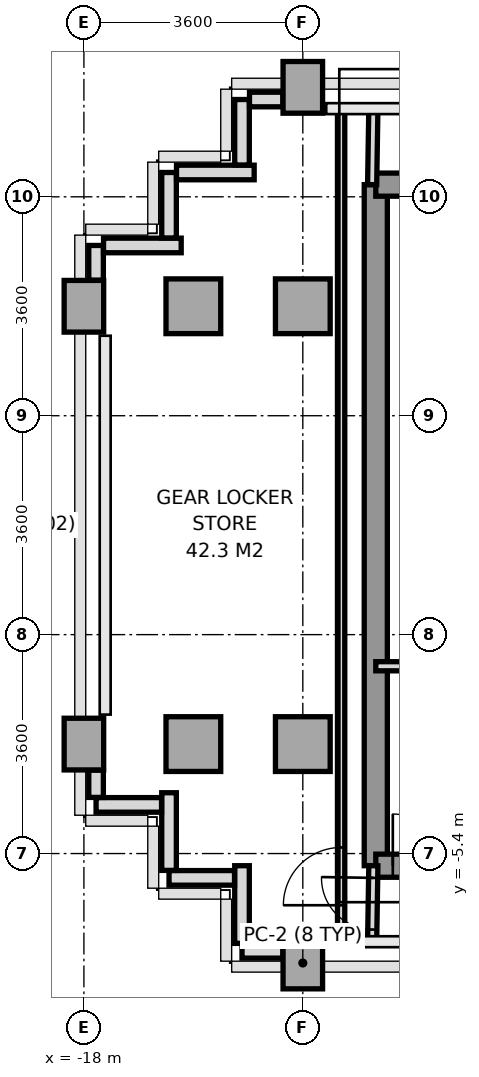
"""IFC4 building model, lengths in metres.
Left out: names, types, materials, properties, quantities, classifications, styles, units other than length and angle.
Written with IfcOpenShell. Run it as: python <this file> out.ifc"""

import sys

from ifc_helpers import new_model, si_unit, direction, frame, frame_2d, origin, origin_2d, place, context, subcontext, project, spatial, rectangle, extrude, source, transform, mapped, element, fill, save


model = new_model("IFC4")
c1 = context("Model", 3, precision=1e-05, world=origin(), true_north=direction((0.0, 1.0)))
c2 = subcontext(c1, "Body", "Model", "MODEL_VIEW")
j1 = project(units=[si_unit("LENGTHUNIT", "METRE"), si_unit("PLANEANGLEUNIT", "RADIAN")], contexts=[c1])
p1 = place(None, origin())
s1 = spatial("IfcSite", under=j1, at=p1, CompositionType="ELEMENT")
p2 = place(p1, origin())
s2 = spatial("IfcBuilding", under=s1, at=p2, CompositionType="ELEMENT")
p3 = place(p2, frame((0.0, 0.0, 167.2)))
s3 = spatial("IfcBuildingStorey", under=s2, at=p3, CompositionType="ELEMENT", Elevation=167.2)
m1 = source(origin(), c2, "Body", "SweptSolid", [
    extrude(rectangle(XDim=0.65, YDim=0.85, at=origin_2d()), origin(), (0.0, 0.0, 1.0), 3.2),
])
for number, where, z_axis, x_axis in (
    (1, (-18.0, -3.6, 0.0), (0.0, 0.0, 1.0), (1.0, 0.0, 0.0)),
    (2, (-18.0, 3.6, 0.0), (0.0, 0.0, 1.0), (1.0, 0.0, 0.0)),
):
    element("IfcColumn", number, at=place(p3, frame(where, z_axis=z_axis, x_axis=x_axis)), inside=s3, PredefinedType="COLUMN", context=c2, shape_type="MappedRepresentation", body=[
        mapped(m1, transform((0.0, 0.0, 0.0), x_axis=(1.0, 0.0, 0.0), y_axis=(0.0, 1.0, 0.0), z_axis=(0.0, 0.0, 1.0), scale=1.0)),
    ])
m2 = source(origin(), c2, "Body", "SweptSolid", [
    extrude(rectangle(XDim=0.9, YDim=0.9, at=origin_2d()), origin(), (0.0, 0.0, 1.0), 3.2),
])
for number, where, z_axis, x_axis in (
    (3, (-16.2, -3.6, 0.0), (0.0, 0.0, 1.0), (1.0, 0.0, 0.0)),
    (4, (-16.2, 3.6, 0.0), (0.0, 0.0, 1.0), (1.0, 0.0, 0.0)),
):
    element("IfcColumn", number, at=place(p3, frame(where, z_axis=z_axis, x_axis=x_axis)), inside=s3, PredefinedType="COLUMN", context=c2, shape_type="MappedRepresentation", body=[
        mapped(m2, transform((0.0, 0.0, 0.0), x_axis=(1.0, 0.0, 0.0), y_axis=(0.0, 1.0, 0.0), z_axis=(0.0, 0.0, 1.0), scale=1.0)),
    ])
p4 = place(p3, frame((-14.4, -7.2, 0.0), z_axis=(0.0, 0.0, 1.0), x_axis=(1.0, 0.0, 0.0)))
e5 = element("IfcColumn", 5, at=p4, inside=s3, PredefinedType="COLUMN", context=c2, shape_type="MappedRepresentation", body=[
    mapped(m1, transform((0.0, 0.0, 0.0), x_axis=(1.0, 0.0, 0.0), y_axis=(0.0, 1.0, 0.0), z_axis=(0.0, 0.0, 1.0), scale=1.0)),
])
for number, where, z_axis, x_axis in (
    (6, (-14.4, -3.6, 0.0), (0.0, 0.0, 1.0), (1.0, 0.0, 0.0)),
    (7, (-14.4, 3.6, 0.0), (0.0, 0.0, 1.0), (1.0, 0.0, 0.0)),
):
    element("IfcColumn", number, at=place(p3, frame(where, z_axis=z_axis, x_axis=x_axis)), inside=s3, PredefinedType="COLUMN", context=c2, shape_type="MappedRepresentation", body=[
        mapped(m2, transform((0.0, 0.0, 0.0), x_axis=(1.0, 0.0, 0.0), y_axis=(0.0, 1.0, 0.0), z_axis=(0.0, 0.0, 1.0), scale=1.0)),
    ])
p5 = place(p3, frame((-14.4, 7.2, 0.0), z_axis=(0.0, 0.0, 1.0), x_axis=(1.0, 0.0, 0.0)))
e8 = element("IfcColumn", 8, at=p5, inside=s3, PredefinedType="COLUMN", context=c2, shape_type="MappedRepresentation", body=[
    mapped(m1, transform((0.0, 0.0, 0.0), x_axis=(1.0, 0.0, 0.0), y_axis=(0.0, 1.0, 0.0), z_axis=(0.0, 0.0, 1.0), scale=1.0)),
])
p6 = place(p3, frame((-14.728, -7.0, 0.0), z_axis=(0.0, 0.0, 1.0), x_axis=(-1.0, 0.0, 0.0)))
e9 = element("IfcWall", 9, at=p6, inside=s3, PredefinedType="PARAPET", context=c2, shape_type="SweptSolid", body=[
    extrude(rectangle(XDim=0.672, YDim=0.24, at=frame_2d((0.336, 0.0))), origin(), (0.0, 0.0, 1.0), 1.15),
])
p7 = place(p3, frame((-15.4, -6.877, 0.0), z_axis=(0.0, 0.0, 1.0), x_axis=(0.0, 1.0, 0.0)))
e10 = element("IfcWall", 10, at=p7, inside=s3, PredefinedType="PARAPET", context=c2, shape_type="SweptSolid", body=[
    extrude(rectangle(XDim=1.277, YDim=0.24, at=frame_2d((0.638, 0.0))), origin(), (0.0, 0.0, 1.0), 1.15),
])
p8 = place(p3, frame((-15.523, -5.8, 0.0), z_axis=(0.0, 0.0, 1.0), x_axis=(-1.0, 0.0, 0.0)))
e11 = element("IfcWall", 11, at=p8, inside=s3, PredefinedType="PARAPET", context=c2, shape_type="SweptSolid", body=[
    extrude(rectangle(XDim=1.077, YDim=0.24, at=frame_2d((0.539, 0.0))), origin(), (0.0, 0.0, 1.0), 1.15),
])
p9 = place(p3, frame((-16.6, -5.677, 0.0), z_axis=(0.0, 0.0, 1.0), x_axis=(0.0, 1.0, 0.0)))
e12 = element("IfcWall", 12, at=p9, inside=s3, PredefinedType="PARAPET", context=c2, shape_type="SweptSolid", body=[
    extrude(rectangle(XDim=1.277, YDim=0.24, at=frame_2d((0.639, 0.0))), origin(), (0.0, 0.0, 1.0), 1.15),
])
p10 = place(p3, frame((-16.723, -4.6, 0.0), z_axis=(0.0, 0.0, 1.0), x_axis=(-1.0, 0.0, 0.0)))
e13 = element("IfcWall", 13, at=p10, inside=s3, PredefinedType="PARAPET", context=c2, shape_type="SweptSolid", body=[
    extrude(rectangle(XDim=1.077, YDim=0.24, at=frame_2d((0.539, 0.0))), origin(), (0.0, 0.0, 1.0), 1.15),
])
p11 = place(p3, frame((-17.8, -4.477, 0.0), z_axis=(0.0, 0.0, 1.0), x_axis=(0.0, 1.0, 0.0)))
e14 = element("IfcWall", 14, at=p11, inside=s3, PredefinedType="PARAPET", context=c2, shape_type="SweptSolid", body=[
    extrude(rectangle(XDim=0.449, YDim=0.24, at=frame_2d((0.225, 0.0))), origin(), (0.0, 0.0, 1.0), 1.15),
])
p12 = place(p3, frame((-17.8, 4.028, 0.0), z_axis=(0.0, 0.0, 1.0), x_axis=(0.0, 1.0, 0.0)))
e15 = element("IfcWall", 15, at=p12, inside=s3, PredefinedType="PARAPET", context=c2, shape_type="SweptSolid", body=[
    extrude(rectangle(XDim=0.572, YDim=0.24, at=frame_2d((0.286, 0.0))), origin(), (0.0, 0.0, 1.0), 1.15),
])
p13 = place(p3, frame((-17.677, 4.6, 0.0), z_axis=(0.0, 0.0, 1.0), x_axis=(1.0, 0.0, 0.0)))
e16 = element("IfcWall", 16, at=p13, inside=s3, PredefinedType="PARAPET", context=c2, shape_type="SweptSolid", body=[
    extrude(rectangle(XDim=1.277, YDim=0.24, at=frame_2d((0.639, 0.0))), origin(), (0.0, 0.0, 1.0), 1.15),
])
p14 = place(p3, frame((-16.6, 4.723, 0.0), z_axis=(0.0, 0.0, 1.0), x_axis=(0.0, 1.0, 0.0)))
e17 = element("IfcWall", 17, at=p14, inside=s3, PredefinedType="PARAPET", context=c2, shape_type="SweptSolid", body=[
    extrude(rectangle(XDim=1.077, YDim=0.24, at=frame_2d((0.539, 0.0))), origin(), (0.0, 0.0, 1.0), 1.15),
])
p15 = place(p3, frame((-16.477, 5.8, 0.0), z_axis=(0.0, 0.0, 1.0), x_axis=(1.0, 0.0, 0.0)))
e18 = element("IfcWall", 18, at=p15, inside=s3, PredefinedType="PARAPET", context=c2, shape_type="SweptSolid", body=[
    extrude(rectangle(XDim=1.277, YDim=0.24, at=frame_2d((0.639, 0.0))), origin(), (0.0, 0.0, 1.0), 1.15),
])
p16 = place(p3, frame((-15.4, 5.923, 0.0), z_axis=(0.0, 0.0, 1.0), x_axis=(0.0, 1.0, 0.0)))
e19 = element("IfcWall", 19, at=p16, inside=s3, PredefinedType="PARAPET", context=c2, shape_type="SweptSolid", body=[
    extrude(rectangle(XDim=1.077, YDim=0.24, at=frame_2d((0.539, 0.0))), origin(), (0.0, 0.0, 1.0), 1.15),
])
p17 = place(p3, frame((-15.277, 7.0, 0.0), z_axis=(0.0, 0.0, 1.0), x_axis=(1.0, 0.0, 0.0)))
e20 = element("IfcWall", 20, at=p17, inside=s3, PredefinedType="PARAPET", context=c2, shape_type="SweptSolid", body=[
    extrude(rectangle(XDim=0.549, YDim=0.24, at=frame_2d((0.274, 0.0))), origin(), (0.0, 0.0, 1.0), 1.15),
])
p18 = place(p3, frame((-13.2, -5.6, 0.0), z_axis=(0.0, 0.0, 1.0), x_axis=(0.0, 1.0, 0.0)))
e21 = element("IfcWall", 21, at=p18, inside=s3, PredefinedType="SHEAR", context=c2, shape_type="SweptSolid", body=[
    extrude(rectangle(XDim=11.2, YDim=0.38, at=frame_2d((5.6, 0.0))), origin(), (0.0, 0.0, 1.0), 3.2),
])
p19 = place(p3, frame((-13.2, 5.6, 0.0), z_axis=(0.0, 0.0, 1.0), x_axis=(1.0, 0.0, 0.0)))
e22 = element("IfcWall", 22, at=p19, inside=s3, PredefinedType="SHEAR", context=c2, shape_type="SweptSolid", body=[
    extrude(rectangle(XDim=1.844, YDim=0.38, at=frame_2d((0.922, 0.0))), origin(), (0.0, 0.0, 1.0), 3.2),
])
p20 = place(p3, frame((-13.2, -5.6, 0.0), z_axis=(0.0, 0.0, 1.0), x_axis=(1.0, 0.0, 0.0)))
e23 = element("IfcWall", 23, at=p20, inside=s3, PredefinedType="SHEAR", context=c2, shape_type="SweptSolid", body=[
    extrude(rectangle(XDim=7.8, YDim=0.38, at=frame_2d((3.9, 0.0))), origin(), (0.0, 0.0, 1.0), 3.2),
])
p21 = place(p20, frame((3.6, 0.0, 0.0)))
e24 = element("IfcOpeningElement", 24, at=p21, cuts=e23, PredefinedType="OPENING", context=c2, shape_type="SweptSolid", body=[
    extrude(rectangle(XDim=1.2, YDim=2.2, at=frame_2d((0.6, 1.1))), frame((0.0, 0.2, 0.0), z_axis=(0.0, -1.0, 0.0), x_axis=(1.0, 0.0, 0.0)), (0.0, 0.0, 1.0), 0.4),
])
p22 = place(p20, frame((0.28, 0.0, 0.0)))
e25 = element("IfcOpeningElement", 25, at=p22, cuts=e23, PredefinedType="OPENING", context=c2, shape_type="SweptSolid", body=[
    extrude(rectangle(XDim=0.85, YDim=2.1, at=frame_2d((0.425, 1.05))), frame((0.0, 0.2, 0.0), z_axis=(0.0, -1.0, 0.0), x_axis=(1.0, 0.0, 0.0)), (0.0, 0.0, 1.0), 0.4),
])
p23 = place(p20, frame((1.36, 0.0, 0.0)))
e26 = element("IfcOpeningElement", 26, at=p23, cuts=e23, PredefinedType="OPENING", context=c2, shape_type="SweptSolid", body=[
    extrude(rectangle(XDim=0.85, YDim=2.1, at=frame_2d((0.425, 1.05))), frame((0.0, 0.2, 0.0), z_axis=(0.0, -1.0, 0.0), x_axis=(1.0, 0.0, 0.0)), (0.0, 0.0, 1.0), 0.4),
])
p24 = place(p3, frame((-13.2, -2.32, 0.0), z_axis=(0.0, 0.0, 1.0), x_axis=(1.0, 0.0, 0.0)))
e27 = element("IfcWall", 27, at=p24, inside=s3, PredefinedType="PARTITIONING", context=c2, shape_type="SweptSolid", body=[
    extrude(rectangle(XDim=2.18, YDim=0.15, at=frame_2d((1.09, 0.0))), origin(), (0.0, 0.0, 1.0), 3.2),
])
p25 = place(p3, frame((-13.26, 5.6, 0.0), z_axis=(0.0, 0.0, 1.0), x_axis=(0.016013571389, 0.999871774545, 0.0)))
e28 = element("IfcWall", 28, at=p25, inside=s3, PredefinedType="PARTITIONING", context=c2, shape_type="SweptSolid", body=[
    extrude(rectangle(XDim=1.25, YDim=0.15, at=frame_2d((0.625, 0.0))), origin(), (0.0, 0.0, 1.0), 3.2),
])
p26 = place(p3, frame((-13.26, -6.85, 0.0), z_axis=(0.0, 0.0, 1.0), x_axis=(0.016013571389, 0.999871774545, 0.0)))
e29 = element("IfcWall", 29, at=p26, inside=s3, PredefinedType="PARTITIONING", context=c2, shape_type="SweptSolid", body=[
    extrude(rectangle(XDim=1.25, YDim=0.15, at=frame_2d((0.625, 0.0))), origin(), (0.0, 0.0, 1.0), 3.2),
])
p27 = place(p26, frame((0.2, 0.0, 0.0)))
e30 = element("IfcOpeningElement", 30, at=p27, cuts=e29, PredefinedType="OPENING", context=c2, shape_type="SweptSolid", body=[
    extrude(rectangle(XDim=0.85, YDim=2.1, at=frame_2d((0.425, 1.05))), frame((0.0, 0.085, 0.0), z_axis=(0.0, -1.0, 0.0), x_axis=(1.0, 0.0, 0.0)), (0.0, 0.0, 1.0), 0.17),
])
p28 = place(p3, frame((-13.77, -6.85, 0.0), z_axis=(0.0, 0.0, 1.0), x_axis=(0.0, 1.0, 0.0)))
e31 = element("IfcWall", 31, at=p28, inside=s3, PredefinedType="PARTITIONING", context=c2, shape_type="SweptSolid", body=[
    extrude(rectangle(XDim=13.7, YDim=0.12, at=frame_2d((6.85, 0.0))), origin(), (0.0, 0.0, 1.0), 2.87),
])
p29 = place(p28, frame((0.6, 0.0, 0.0)))
e32 = element("IfcOpeningElement", 32, at=p29, cuts=e31, PredefinedType="OPENING", context=c2, shape_type="SweptSolid", body=[
    extrude(rectangle(XDim=0.95, YDim=2.15, at=frame_2d((0.475, 1.075))), frame((0.0, 0.07, 0.0), z_axis=(0.0, -1.0, 0.0), x_axis=(1.0, 0.0, 0.0)), (0.0, 0.0, 1.0), 0.14),
])
m3 = source(origin(), c2, "Body", "SweptSolid", [
    extrude(rectangle(XDim=0.85, YDim=2.1, at=frame_2d((0.425, 1.05))), frame((0.0, 0.025, 0.0), z_axis=(0.0, -1.0, 0.0), x_axis=(1.0, 0.0, 0.0)), (0.0, 0.0, 1.0), 0.05),
])
p30 = place(p22, origin())
e33 = element("IfcDoor", 33, at=p30, inside=s3, OperationType="SINGLE_SWING_LEFT", PredefinedType="DOOR", context=c2, shape_type="MappedRepresentation", body=[
    mapped(m3, transform((0.0, 0.0, 0.0), x_axis=(1.0, 0.0, 0.0), y_axis=(0.0, 1.0, 0.0), z_axis=(0.0, 0.0, 1.0), scale=1.0)),
])
fill(e25, e33)
m4 = source(origin(), c2, "Body", "SweptSolid", [
    extrude(rectangle(XDim=0.95, YDim=2.15, at=frame_2d((0.475, 1.075))), frame((0.0, 0.025, 0.0), z_axis=(0.0, -1.0, 0.0), x_axis=(1.0, 0.0, 0.0)), (0.0, 0.0, 1.0), 0.05),
])
p31 = place(p29, origin())
e34 = element("IfcDoor", 34, at=p31, inside=s3, OperationType="SINGLE_SWING_LEFT", PredefinedType="DOOR", context=c2, shape_type="MappedRepresentation", body=[
    mapped(m4, transform((0.0, 0.0, 0.0), x_axis=(1.0, 0.0, 0.0), y_axis=(0.0, 1.0, 0.0), z_axis=(0.0, 0.0, 1.0), scale=1.0)),
])
fill(e32, e34)
p32 = place(p27, origin())
e35 = element("IfcDoor", 35, at=p32, inside=s3, OperationType="SINGLE_SWING_RIGHT", PredefinedType="DOOR", context=c2, shape_type="MappedRepresentation", body=[
    mapped(m3, transform((0.0, 0.0, 0.0), x_axis=(1.0, 0.0, 0.0), y_axis=(0.0, 1.0, 0.0), z_axis=(0.0, 0.0, 1.0), scale=1.0)),
])
fill(e30, e35)
save(model, sys.argv[1])
